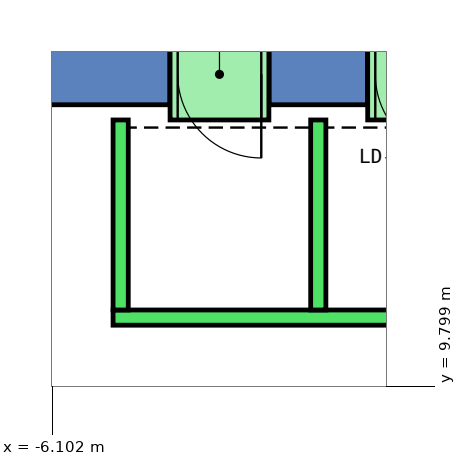
"""IFC4 building model, lengths in metres.
Left out: names, types, materials, properties, quantities, classifications, styles, units other than length and angle.
Written with IfcOpenShell. Run it as: python <this file> out.ifc"""

import sys

from ifc_helpers import new_model, si_unit, direction, frame, frame_2d, origin, place, context, subcontext, project, spatial, polyline, rectangle, outline, extrude, element, fill, save


model = new_model("IFC4")
c1 = context("Model", 3, precision=1e-05, world=origin(), true_north=direction((0.0, 1.0)))
c2 = subcontext(c1, "Body", "Model", "MODEL_VIEW")
j1 = project(units=[si_unit("LENGTHUNIT", "METRE"), si_unit("PLANEANGLEUNIT", "RADIAN")], contexts=[c1])
p1 = place(None, origin())
s1 = spatial("IfcSite", under=j1, at=p1, CompositionType="ELEMENT")
p2 = place(p1, origin())
s2 = spatial("IfcBuilding", under=s1, at=p2, CompositionType="ELEMENT")
p3 = place(p2, frame((0.0, 0.0, 15.0)))
s3 = spatial("IfcBuildingStorey", under=s2, at=p3, CompositionType="ELEMENT", Elevation=15.0)
p4 = place(p3, frame((0.0, 0.0, -0.45)))
e1 = element("IfcWall", 1, at=p4, inside=s3, PredefinedType="SHEAR", context=c2, shape_type="SweptSolid", body=[
    extrude(outline(polyline([(-3.25, 14.5), (-3.25, 13.5), (-1.95, 13.5), (-1.95, 14.5), (-3.25, 14.5)])), origin(), (0.0, 0.0, 1.0), 5.0),
])
p5 = place(p3, frame((0.0, 0.0, -0.45)))
e2 = element("IfcWall", 2, at=p5, inside=s3, PredefinedType="SHEAR", context=c2, shape_type="SweptSolid", body=[
    extrude(outline(polyline([(-4.55, 13.5), (-4.55, 14.5), (-6.928, 14.5), (-6.351, 13.5), (-4.55, 13.5)])), origin(), (0.0, 0.0, 1.0), 5.0),
])
p6 = place(p3, frame((0.0, 0.0, 3.6)))
e3 = element("IfcWall", 3, at=p6, inside=s3, PredefinedType="SHEAR", context=c2, shape_type="SweptSolid", body=[
    extrude(outline(polyline([(-1.95, 14.5), (-1.95, 13.5), (-0.65, 13.5), (-0.65, 14.5), (-1.95, 14.5)])), origin(), (0.0, 0.0, 1.0), 0.95),
])
p7 = place(p3, frame((0.0, 0.0, 3.6)))
e4 = element("IfcWall", 4, at=p7, inside=s3, PredefinedType="SHEAR", context=c2, shape_type="SweptSolid", body=[
    extrude(outline(polyline([(-4.55, 14.5), (-4.55, 13.5), (-3.25, 13.5), (-3.25, 14.5), (-4.55, 14.5)])), origin(), (0.0, 0.0, 1.0), 0.95),
])
p8 = place(p3, frame((5.3, 10.7, 0.0), z_axis=(0.0, 0.0, 1.0), x_axis=(-1.0, 0.0, 0.0)))
e5 = element("IfcWall", 5, at=p8, inside=s3, PredefinedType="STANDARD", context=c2, shape_type="SweptSolid", body=[
    extrude(rectangle(XDim=10.6, YDim=0.2, at=frame_2d((5.3, 0.0))), origin(), (0.0, 0.0, 1.0), 4.55),
])
for number, where, z_axis, x_axis in (
    (6, (-2.6, 10.8, 0.0), (0.0, 0.0, 1.0), (0.0, 1.0, 0.0)),
    (7, (-5.2, 10.8, 0.0), (0.0, 0.0, 1.0), (0.0, 1.0, 0.0)),
):
    element("IfcWall", number, at=place(p3, frame(where, z_axis=z_axis, x_axis=x_axis)), inside=s3, PredefinedType="STANDARD", context=c2, shape_type="SweptSolid", body=[
        extrude(rectangle(XDim=2.5, YDim=0.2, at=frame_2d((1.25, 0.0))), origin(), (0.0, 0.0, 1.0), 4.55),
    ])
p9 = place(p3, frame((-0.65, 13.9, 0.0), z_axis=(0.0, 0.0, 1.0), x_axis=(-1.0, 0.0, 0.0)))
e8 = element("IfcWall", 8, at=p9, inside=s3, PredefinedType="STANDARD", context=c2, shape_type="SweptSolid", body=[
    extrude(rectangle(XDim=1.3, YDim=1.2, at=frame_2d((0.65, 0.0))), origin(), (0.0, 0.0, 1.0), 2.4),
])
p10 = place(p9, frame((0.1, 0.0, 0.0)))
e9 = element("IfcOpeningElement", 9, at=p10, cuts=e8, PredefinedType="OPENING", context=c2, shape_type="SweptSolid", body=[
    extrude(rectangle(XDim=1.1, YDim=2.3, at=frame_2d((0.55, 1.15))), frame((0.0, 0.61, 0.0), z_axis=(0.0, -1.0, 0.0), x_axis=(1.0, 0.0, 0.0)), (0.0, 0.0, 1.0), 1.22),
])
p11 = place(p3, frame((-3.25, 13.9, 0.0), z_axis=(0.0, 0.0, 1.0), x_axis=(-1.0, 0.0, 0.0)))
e10 = element("IfcWall", 10, at=p11, inside=s3, PredefinedType="STANDARD", context=c2, shape_type="SweptSolid", body=[
    extrude(rectangle(XDim=1.3, YDim=1.2, at=frame_2d((0.65, 0.0))), origin(), (0.0, 0.0, 1.0), 2.4),
])
p12 = place(p11, frame((0.1, 0.0, 0.0)))
e11 = element("IfcOpeningElement", 11, at=p12, cuts=e10, PredefinedType="OPENING", context=c2, shape_type="SweptSolid", body=[
    extrude(rectangle(XDim=1.1, YDim=2.3, at=frame_2d((0.55, 1.15))), frame((0.0, 0.61, 0.0), z_axis=(0.0, -1.0, 0.0), x_axis=(1.0, 0.0, 0.0)), (0.0, 0.0, 1.0), 1.22),
])
p13 = place(p10, origin())
e12 = element("IfcDoor", 12, at=p13, inside=s3, OperationType="SLIDING_TO_LEFT", PredefinedType="DOOR", context=c2, shape_type="SweptSolid", body=[
    extrude(rectangle(XDim=1.1, YDim=2.3, at=frame_2d((0.55, 1.15))), frame((0.0, 0.025, 0.0), z_axis=(0.0, -1.0, 0.0), x_axis=(1.0, 0.0, 0.0)), (0.0, 0.0, 1.0), 0.05),
])
fill(e9, e12)
p14 = place(p12, origin())
e13 = element("IfcDoor", 13, at=p14, inside=s3, OperationType="SLIDING_TO_LEFT", PredefinedType="DOOR", context=c2, shape_type="SweptSolid", body=[
    extrude(rectangle(XDim=1.1, YDim=2.3, at=frame_2d((0.55, 1.15))), frame((0.0, 0.025, 0.0), z_axis=(0.0, -1.0, 0.0), x_axis=(1.0, 0.0, 0.0)), (0.0, 0.0, 1.0), 0.05),
])
fill(e11, e13)
save(model, sys.argv[1])
